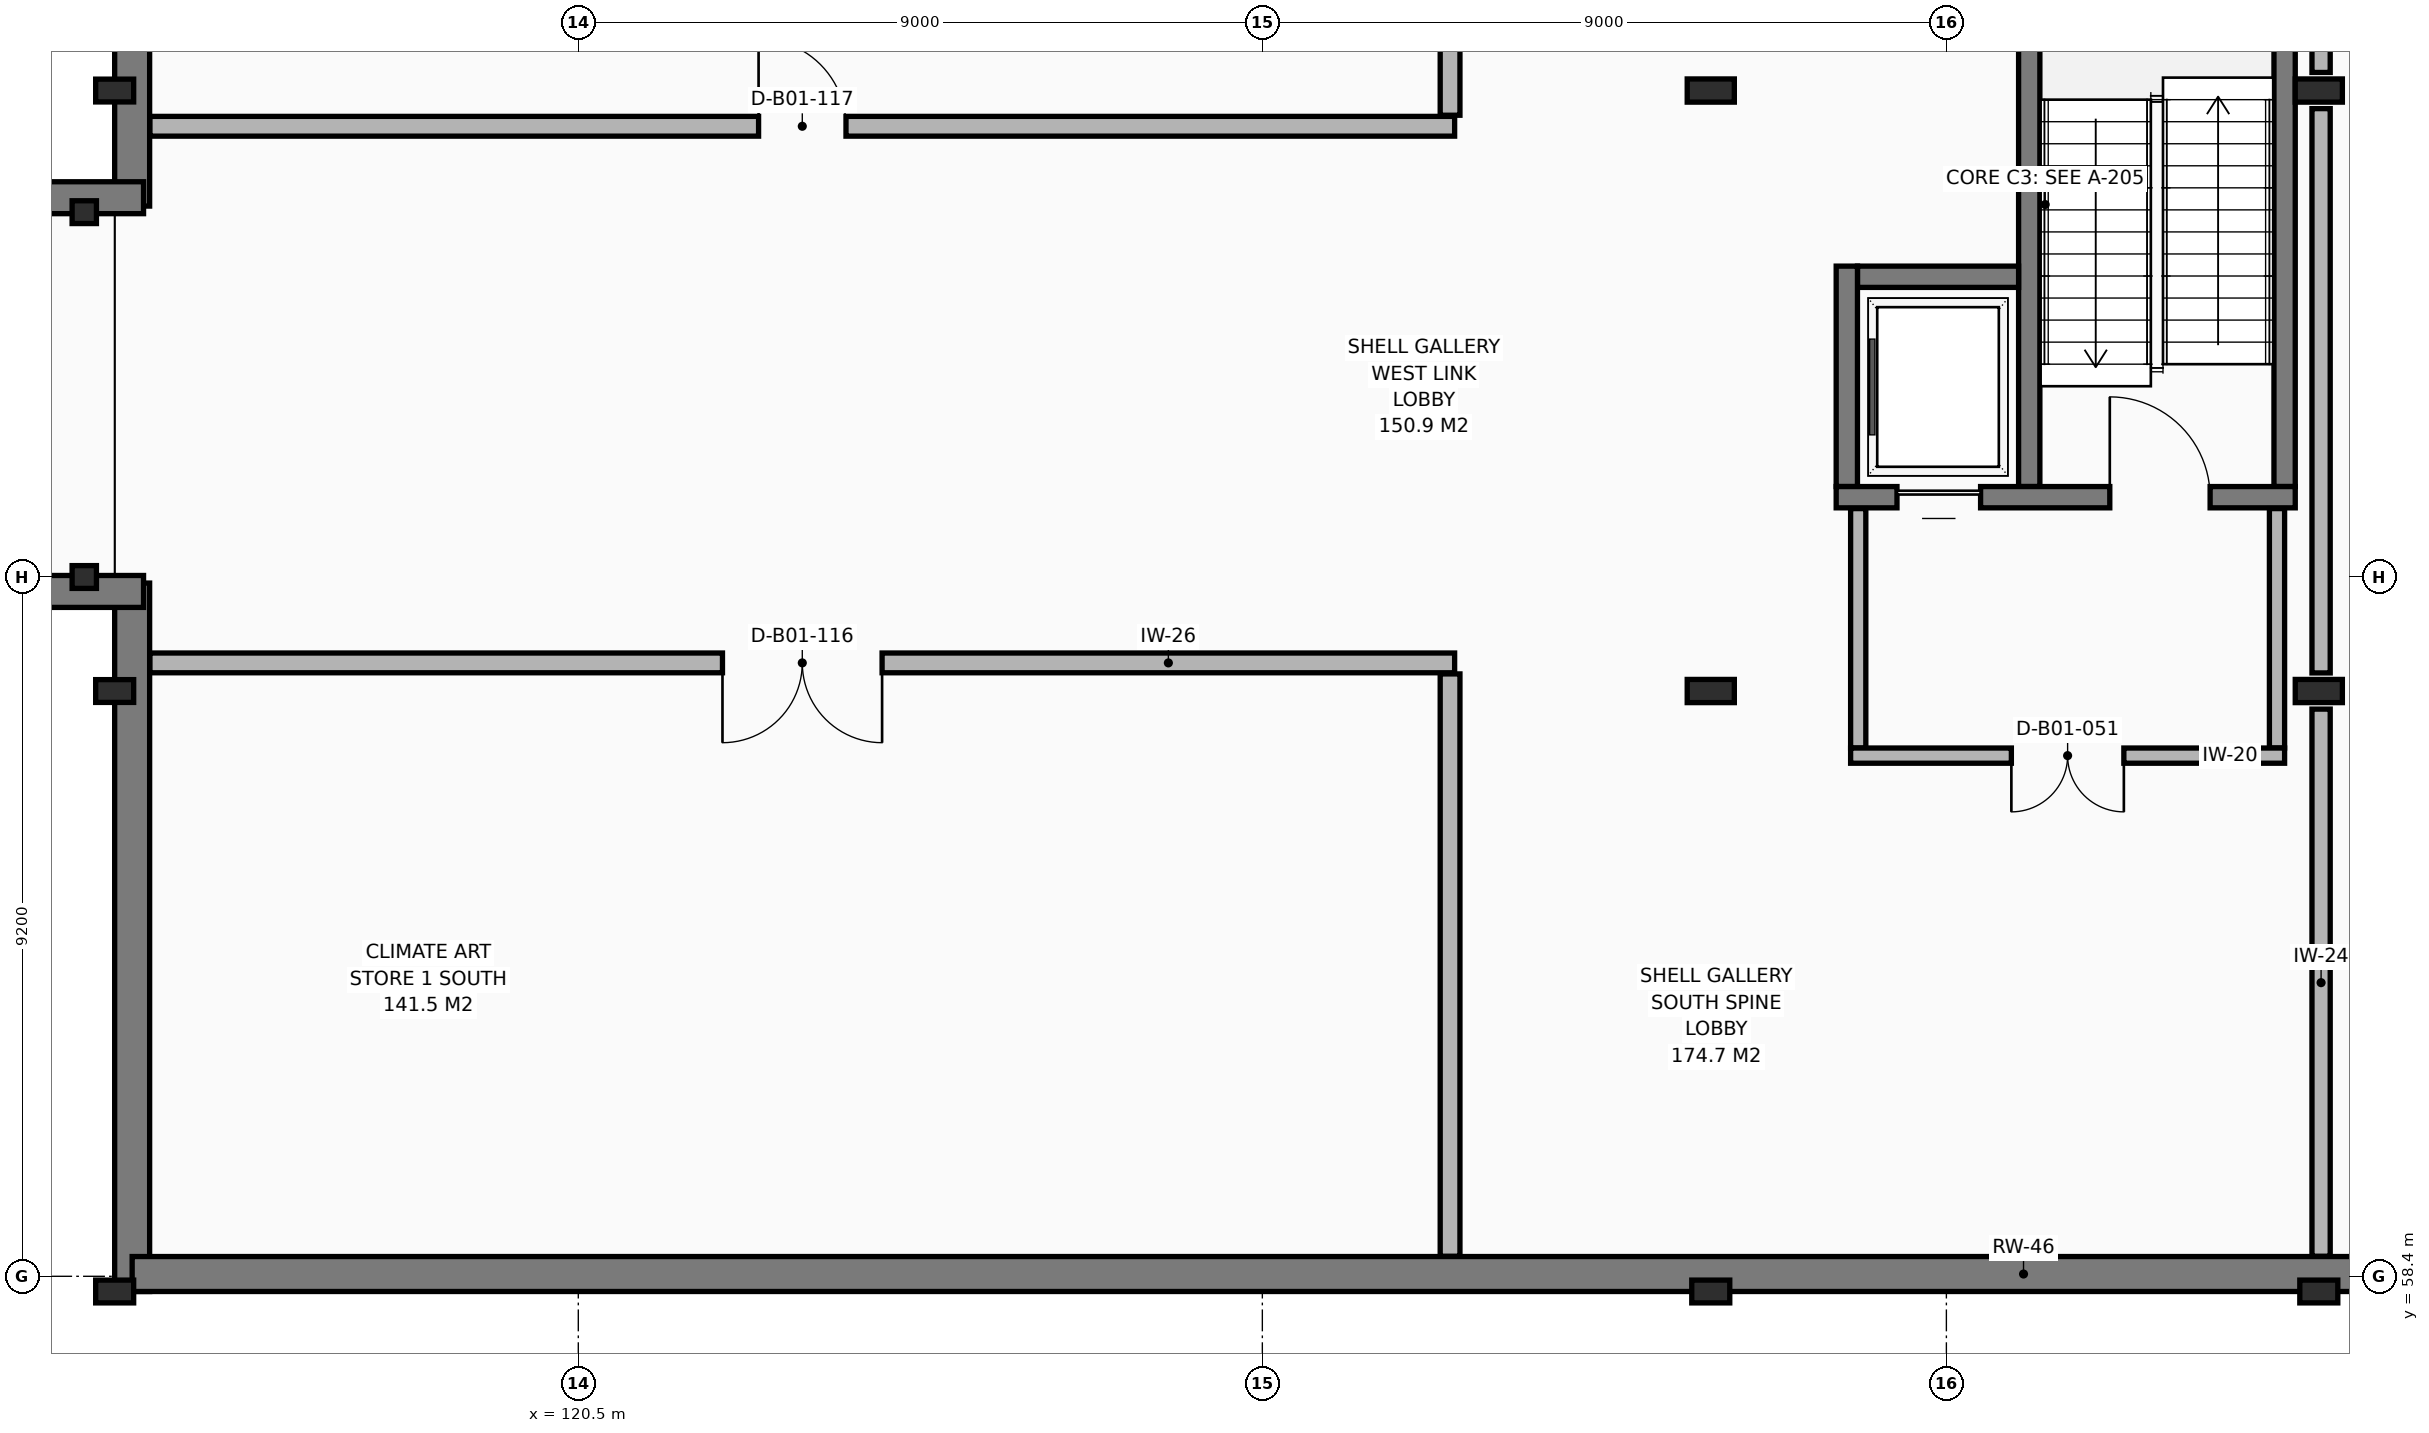
"""IFC4 building model, lengths in metres.
Left out: names, types, materials, properties, quantities, classifications, styles, units other than length and angle.
Written with IfcOpenShell. Run it as: python <this file> out.ifc"""

import sys

from ifc_helpers import new_model, si_unit, direction, frame, frame_2d, origin, origin_2d, place, context, subcontext, project, spatial, rectangle, i_section, extrude, element, fill, save


model = new_model("IFC4")
c1 = context("Model", 3, precision=1e-05, world=origin(), true_north=direction((0.0, 1.0)))
c2 = subcontext(c1, "Body", "Model", "MODEL_VIEW")
j1 = project(units=[si_unit("LENGTHUNIT", "METRE"), si_unit("PLANEANGLEUNIT", "RADIAN")], contexts=[c1])
p1 = place(None, origin())
s1 = spatial("IfcSite", under=j1, at=p1, CompositionType="ELEMENT")
p2 = place(p1, origin())
s2 = spatial("IfcBuilding", under=s1, at=p2, CompositionType="ELEMENT")
p3 = place(p2, frame((0.0, 0.0, -4.8)))
s3 = spatial("IfcBuildingStorey", under=s2, at=p3, CompositionType="ELEMENT", Elevation=-4.8)
for number, where, z_axis, x_axis in (
    (1, (114.4, 58.2, 0.0), (0.0, 0.0, 1.0), (1.0, 0.0, 0.0)),
    (2, (114.4, 66.1, 0.0), (0.0, 0.0, 1.0), (1.0, 0.0, 0.0)),
    (3, (114.4, 74.0, 0.0), (0.0, 0.0, 1.0), (1.0, 0.0, 0.0)),
    (4, (135.4, 58.2, 0.0), (0.0, 0.0, 1.0), (1.0, 0.0, 0.0)),
):
    element("IfcColumn", number, at=place(p3, frame(where, z_axis=z_axis, x_axis=x_axis)), inside=s3, PredefinedType="COLUMN", context=c2, shape_type="SweptSolid", body=[
        extrude(i_section(OverallWidth=0.3, OverallDepth=0.5, WebThickness=0.014, FlangeThickness=0.028, FilletRadius=0.027, at=origin_2d()), origin(), (0.0, 0.0, 1.0), 4.8),
    ])
for number, where, z_axis, x_axis in (
    (5, (135.4, 66.1, 0.0), (0.0, 0.0, 1.0), (1.0, 0.0, 0.0)),
    (6, (135.4, 74.0, 0.0), (0.0, 0.0, 1.0), (1.0, 0.0, 0.0)),
):
    element("IfcColumn", number, at=place(p3, frame(where, z_axis=z_axis, x_axis=x_axis)), inside=s3, PredefinedType="COLUMN", context=c2, shape_type="SweptSolid", body=[
        extrude(i_section(OverallWidth=0.305, OverallDepth=0.62, WebThickness=0.021, FlangeThickness=0.04, FilletRadius=0.027, at=origin_2d()), origin(), (0.0, 0.0, 1.0), 4.8),
    ])
p4 = place(p3, frame((143.4, 58.2, 0.0), z_axis=(0.0, 0.0, 1.0), x_axis=(1.0, 0.0, 0.0)))
e7 = element("IfcColumn", 7, at=p4, inside=s3, PredefinedType="COLUMN", context=c2, shape_type="SweptSolid", body=[
    extrude(i_section(OverallWidth=0.3, OverallDepth=0.5, WebThickness=0.014, FlangeThickness=0.028, FilletRadius=0.027, at=origin_2d()), origin(), (0.0, 0.0, 1.0), 4.8),
])
for number, where, z_axis, x_axis in (
    (8, (143.4, 66.1, 0.0), (0.0, 0.0, 1.0), (1.0, 0.0, 0.0)),
    (9, (143.4, 74.0, 0.0), (0.0, 0.0, 1.0), (1.0, 0.0, 0.0)),
):
    element("IfcColumn", number, at=place(p3, frame(where, z_axis=z_axis, x_axis=x_axis)), inside=s3, PredefinedType="COLUMN", context=c2, shape_type="SweptSolid", body=[
        extrude(i_section(OverallWidth=0.305, OverallDepth=0.62, WebThickness=0.021, FlangeThickness=0.04, FilletRadius=0.027, at=origin_2d()), origin(), (0.0, 0.0, 1.0), 4.8),
    ])
for number, where, z_axis, x_axis in (
    (10, (114.0, 67.6, 0.0), (0.0, 0.0, 1.0), (1.0, 0.0, 0.0)),
    (11, (114.0, 72.4, 0.0), (0.0, 0.0, 1.0), (1.0, 0.0, 0.0)),
):
    element("IfcColumn", number, at=place(p3, frame(where, z_axis=z_axis, x_axis=x_axis)), inside=s3, PredefinedType="COLUMN", context=c2, shape_type="SweptSolid", body=[
        extrude(i_section(OverallWidth=0.3, OverallDepth=0.32, WebThickness=0.011, FlangeThickness=0.021, FilletRadius=0.027, at=origin_2d()), origin(), (0.0, 0.0, 1.0), 4.8),
    ])
p5 = place(p3, frame((114.63, 58.2, 0.0), z_axis=(0.0, 0.0, 1.0), x_axis=(0.0, 1.0, 0.0)))
e12 = element("IfcWall", 12, at=p5, inside=s3, PredefinedType="USERDEFINED", context=c2, shape_type="SweptSolid", body=[
    extrude(rectangle(XDim=9.32, YDim=0.46, at=frame_2d((4.66, 0.0))), origin(), (0.0, 0.0, 1.0), 4.55),
])
p6 = place(p3, frame((114.63, 72.48, 0.0), z_axis=(0.0, 0.0, 1.0), x_axis=(0.0, 1.0, 0.0)))
e13 = element("IfcWall", 13, at=p6, inside=s3, PredefinedType="USERDEFINED", context=c2, shape_type="SweptSolid", body=[
    extrude(rectangle(XDim=40.79, YDim=0.46, at=frame_2d((20.395, 0.0))), origin(), (0.0, 0.0, 1.0), 4.55),
])
p7 = place(p3, frame((164.4, 58.43, 0.0), z_axis=(0.0, 0.0, 1.0), x_axis=(-1.0, 0.0, 0.0)))
e14 = element("IfcWall", 14, at=p7, inside=s3, PredefinedType="USERDEFINED", context=c2, shape_type="SweptSolid", body=[
    extrude(rectangle(XDim=49.77, YDim=0.46, at=frame_2d((24.885, 0.0))), origin(), (0.0, 0.0, 1.0), 4.55),
])
for number, where, z_axis, x_axis in (
    (15, (114.78, 67.41, 0.0), (0.0, 0.0, 1.0), (-1.0, 0.0, 0.0)),
    (16, (107.82, 72.59, 0.0), (0.0, 0.0, 1.0), (1.0, 0.0, 0.0)),
):
    element("IfcWall", number, at=place(p3, frame(where, z_axis=z_axis, x_axis=x_axis)), inside=s3, PredefinedType="USERDEFINED", context=c2, shape_type="SweptSolid", body=[
        extrude(rectangle(XDim=6.96, YDim=0.42, at=frame_2d((3.48, 0.0))), origin(), (0.0, 0.0, 1.0), 4.55),
    ])
for number, where, z_axis, x_axis in (
    (17, (142.95, 68.79, 0.0), (0.0, 0.0, 1.0), (0.0, 1.0, 0.0)),
    (18, (139.59, 76.49, 0.0), (0.0, 0.0, 1.0), (0.0, -1.0, 0.0)),
):
    element("IfcWall", number, at=place(p3, frame(where, z_axis=z_axis, x_axis=x_axis)), inside=s3, PredefinedType="SHEAR", context=c2, shape_type="SweptSolid", body=[
        extrude(rectangle(XDim=7.7, YDim=0.28, at=frame_2d((3.85, 0.0))), origin(), (0.0, 0.0, 1.0), 4.55),
    ])
p8 = place(p3, frame((139.45, 71.55, 0.0), z_axis=(0.0, 0.0, 1.0), x_axis=(-1.0, 0.0, 0.0)))
e19 = element("IfcWall", 19, at=p8, inside=s3, PredefinedType="SHEAR", context=c2, shape_type="SweptSolid", body=[
    extrude(rectangle(XDim=2.12, YDim=0.28, at=frame_2d((1.06, 0.0))), origin(), (0.0, 0.0, 1.0), 4.55),
])
p9 = place(p3, frame((137.19, 71.69, 0.0), z_axis=(0.0, 0.0, 1.0), x_axis=(0.0, -1.0, 0.0)))
e20 = element("IfcWall", 20, at=p9, inside=s3, PredefinedType="SHEAR", context=c2, shape_type="SweptSolid", body=[
    extrude(rectangle(XDim=2.9, YDim=0.28, at=frame_2d((1.45, 0.0))), origin(), (0.0, 0.0, 1.0), 4.55),
])
p10 = place(p3, frame((137.05, 68.65, 0.0), z_axis=(0.0, 0.0, 1.0), x_axis=(1.0, 0.0, 0.0)))
e21 = element("IfcWall", 21, at=p10, inside=s3, PredefinedType="SHEAR", context=c2, shape_type="SweptSolid", body=[
    extrude(rectangle(XDim=6.04, YDim=0.28, at=frame_2d((3.02, 0.0))), origin(), (0.0, 0.0, 1.0), 4.55),
])
p11 = place(p10, frame((0.8, 0.0, 0.0)))
e22 = element("IfcOpeningElement", 22, at=p11, cuts=e21, PredefinedType="OPENING", context=c2, shape_type="SweptSolid", body=[
    extrude(rectangle(XDim=1.1, YDim=2.12, at=frame_2d((0.55, 1.06))), frame((0.0, 0.15, 0.0), z_axis=(0.0, -1.0, 0.0), x_axis=(1.0, 0.0, 0.0)), (0.0, 0.0, 1.0), 0.3),
])
p12 = place(p10, frame((3.6, 0.0, 0.0)))
e23 = element("IfcOpeningElement", 23, at=p12, cuts=e21, PredefinedType="OPENING", context=c2, shape_type="SweptSolid", body=[
    extrude(rectangle(XDim=1.32, YDim=2.12, at=frame_2d((0.66, 1.06))), frame((0.0, 0.15, 0.0), z_axis=(0.0, -1.0, 0.0), x_axis=(1.0, 0.0, 0.0)), (0.0, 0.0, 1.0), 0.3),
])
for number, where, z_axis, x_axis in (
    (24, (142.85, 65.35, 0.0), (0.0, 0.0, 1.0), (0.0, 1.0, 0.0)),
    (25, (137.34, 68.5, 0.0), (0.0, 0.0, 1.0), (0.0, -1.0, 0.0)),
):
    element("IfcWall", number, at=place(p3, frame(where, z_axis=z_axis, x_axis=x_axis)), inside=s3, PredefinedType="PARTITIONING", context=c2, shape_type="SweptSolid", body=[
        extrude(rectangle(XDim=3.15, YDim=0.2, at=frame_2d((1.575, 0.0))), origin(), (0.0, 0.0, 1.0), 3.94),
    ])
p13 = place(p3, frame((142.95, 65.25, 0.0), z_axis=(0.0, 0.0, 1.0), x_axis=(-1.0, 0.0, 0.0)))
e26 = element("IfcWall", 26, at=p13, inside=s3, PredefinedType="PARTITIONING", context=c2, shape_type="SweptSolid", body=[
    extrude(rectangle(XDim=5.71, YDim=0.2, at=frame_2d((2.855, 0.0))), origin(), (0.0, 0.0, 1.0), 4.55),
])
p14 = place(p13, frame((2.115, 0.0, 0.0)))
e27 = element("IfcOpeningElement", 27, at=p14, cuts=e26, PredefinedType="OPENING", context=c2, shape_type="SweptSolid", body=[
    extrude(rectangle(XDim=1.48, YDim=2.15, at=frame_2d((0.74, 1.075))), frame((0.0, 0.11, 0.0), z_axis=(0.0, -1.0, 0.0), x_axis=(1.0, 0.0, 0.0)), (0.0, 0.0, 1.0), 0.22),
])
p15 = place(p3, frame((132.03, 66.47, 0.0), z_axis=(0.0, 0.0, 1.0), x_axis=(-1.0, 0.0, 0.0)))
e28 = element("IfcWall", 28, at=p15, inside=s3, PredefinedType="PARTITIONING", context=c2, shape_type="SweptSolid", body=[
    extrude(rectangle(XDim=17.166, YDim=0.26, at=frame_2d((8.583, 0.0))), origin(), (0.0, 0.0, 1.0), 3.98),
])
p16 = place(p15, frame((7.533, 0.0, 0.0)))
e29 = element("IfcOpeningElement", 29, at=p16, cuts=e28, PredefinedType="OPENING", context=c2, shape_type="SweptSolid", body=[
    extrude(rectangle(XDim=2.1, YDim=2.25, at=frame_2d((1.05, 1.125))), frame((0.0, 0.14, 0.0), z_axis=(0.0, -1.0, 0.0), x_axis=(1.0, 0.0, 0.0)), (0.0, 0.0, 1.0), 0.28),
])
p17 = place(p3, frame((114.864, 73.53, 0.0), z_axis=(0.0, 0.0, 1.0), x_axis=(1.0, 0.0, 0.0)))
e30 = element("IfcWall", 30, at=p17, inside=s3, PredefinedType="PARTITIONING", context=c2, shape_type="SweptSolid", body=[
    extrude(rectangle(XDim=17.166, YDim=0.26, at=frame_2d((8.583, 0.0))), origin(), (0.0, 0.0, 1.0), 3.98),
])
p18 = place(p17, frame((8.008, 0.0, 0.0)))
e31 = element("IfcOpeningElement", 31, at=p18, cuts=e30, PredefinedType="OPENING", context=c2, shape_type="SweptSolid", body=[
    extrude(rectangle(XDim=1.15, YDim=2.15, at=frame_2d((0.575, 1.075))), frame((0.0, 0.14, 0.0), z_axis=(0.0, -1.0, 0.0), x_axis=(1.0, 0.0, 0.0)), (0.0, 0.0, 1.0), 0.28),
])
p19 = place(p3, frame((131.97, 58.664, 0.0), z_axis=(0.0, 0.0, 1.0), x_axis=(0.0, 1.0, 0.0)))
e32 = element("IfcWall", 32, at=p19, inside=s3, PredefinedType="PARTITIONING", context=c2, shape_type="SweptSolid", body=[
    extrude(rectangle(XDim=7.661, YDim=0.26, at=frame_2d((3.831, 0.0))), origin(), (0.0, 0.0, 1.0), 3.53),
])
p20 = place(p3, frame((131.97, 73.675, 0.0), z_axis=(0.0, 0.0, 1.0), x_axis=(0.0, 1.0, 0.0)))
e33 = element("IfcWall", 33, at=p20, inside=s3, PredefinedType="PARTITIONING", context=c2, shape_type="SweptSolid", body=[
    extrude(rectangle(XDim=8.925, YDim=0.26, at=frame_2d((4.462, 0.0))), origin(), (0.0, 0.0, 1.0), 3.53),
])
p21 = place(p3, frame((143.43, 73.762, 0.0), z_axis=(0.0, 0.0, 1.0), x_axis=(0.0, -1.0, 0.0)))
e34 = element("IfcWall", 34, at=p21, inside=s3, PredefinedType="PARTITIONING", context=c2, shape_type="SweptSolid", body=[
    extrude(rectangle(XDim=7.424, YDim=0.24, at=frame_2d((3.712, 0.0))), origin(), (0.0, 0.0, 1.0), 3.53),
])
p22 = place(p3, frame((143.43, 65.862, 0.0), z_axis=(0.0, 0.0, 1.0), x_axis=(0.0, -1.0, 0.0)))
e35 = element("IfcWall", 35, at=p22, inside=s3, PredefinedType="PARTITIONING", context=c2, shape_type="SweptSolid", body=[
    extrude(rectangle(XDim=7.198, YDim=0.24, at=frame_2d((3.599, 0.0))), origin(), (0.0, 0.0, 1.0), 3.53),
])
p23 = place(p3, frame((143.43, 80.53, 0.0), z_axis=(0.0, 0.0, 1.0), x_axis=(0.0, -1.0, 0.0)))
e36 = element("IfcWall", 36, at=p23, inside=s3, PredefinedType="PARTITIONING", context=c2, shape_type="SweptSolid", body=[
    extrude(rectangle(XDim=6.292, YDim=0.24, at=frame_2d((3.146, 0.0))), origin(), (0.0, 0.0, 1.0), 3.53),
])
p24 = place(p23, frame((2.526, 0.0, 0.0)))
e37 = element("IfcOpeningElement", 37, at=p24, cuts=e36, PredefinedType="OPENING", context=c2, shape_type="SweptSolid", body=[
    extrude(rectangle(XDim=1.24, YDim=2.15, at=frame_2d((0.62, 1.075))), frame((0.0, 0.13, 0.0), z_axis=(0.0, -1.0, 0.0), x_axis=(1.0, 0.0, 0.0)), (0.0, 0.0, 1.0), 0.26),
])
p25 = place(p11, origin())
e38 = element("IfcDoor", 38, at=p25, inside=s3, OperationType="SLIDING_TO_LEFT", PredefinedType="DOOR", context=c2, shape_type="SweptSolid", body=[
    extrude(rectangle(XDim=1.1, YDim=2.12, at=frame_2d((0.55, 1.06))), frame((0.0, 0.025, 0.0), z_axis=(0.0, -1.0, 0.0), x_axis=(1.0, 0.0, 0.0)), (0.0, 0.0, 1.0), 0.05),
])
fill(e22, e38)
p26 = place(p12, origin())
e39 = element("IfcDoor", 39, at=p26, inside=s3, OperationType="SINGLE_SWING_LEFT", PredefinedType="DOOR", context=c2, shape_type="SweptSolid", body=[
    extrude(rectangle(XDim=1.32, YDim=2.12, at=frame_2d((0.66, 1.06))), frame((0.0, 0.025, 0.0), z_axis=(0.0, -1.0, 0.0), x_axis=(1.0, 0.0, 0.0)), (0.0, 0.0, 1.0), 0.05),
])
fill(e23, e39)
p27 = place(p14, origin())
e40 = element("IfcDoor", 40, at=p27, inside=s3, OperationType="DOUBLE_DOOR_SINGLE_SWING", PredefinedType="DOOR", context=c2, shape_type="SweptSolid", body=[
    extrude(rectangle(XDim=1.48, YDim=2.15, at=frame_2d((0.74, 1.075))), frame((0.0, 0.025, 0.0), z_axis=(0.0, -1.0, 0.0), x_axis=(1.0, 0.0, 0.0)), (0.0, 0.0, 1.0), 0.05),
])
fill(e27, e40)
p28 = place(p16, origin())
e41 = element("IfcDoor", 41, at=p28, inside=s3, OperationType="DOUBLE_DOOR_SINGLE_SWING", PredefinedType="DOOR", context=c2, shape_type="SweptSolid", body=[
    extrude(rectangle(XDim=2.1, YDim=2.25, at=frame_2d((1.05, 1.125))), frame((0.0, 0.025, 0.0), z_axis=(0.0, -1.0, 0.0), x_axis=(1.0, 0.0, 0.0)), (0.0, 0.0, 1.0), 0.05),
])
fill(e29, e41)
p29 = place(p18, origin())
e42 = element("IfcDoor", 42, at=p29, inside=s3, OperationType="SINGLE_SWING_LEFT", PredefinedType="DOOR", context=c2, shape_type="SweptSolid", body=[
    extrude(rectangle(XDim=1.15, YDim=2.15, at=frame_2d((0.575, 1.075))), frame((0.0, 0.025, 0.0), z_axis=(0.0, -1.0, 0.0), x_axis=(1.0, 0.0, 0.0)), (0.0, 0.0, 1.0), 0.05),
])
fill(e31, e42)
save(model, sys.argv[1])
